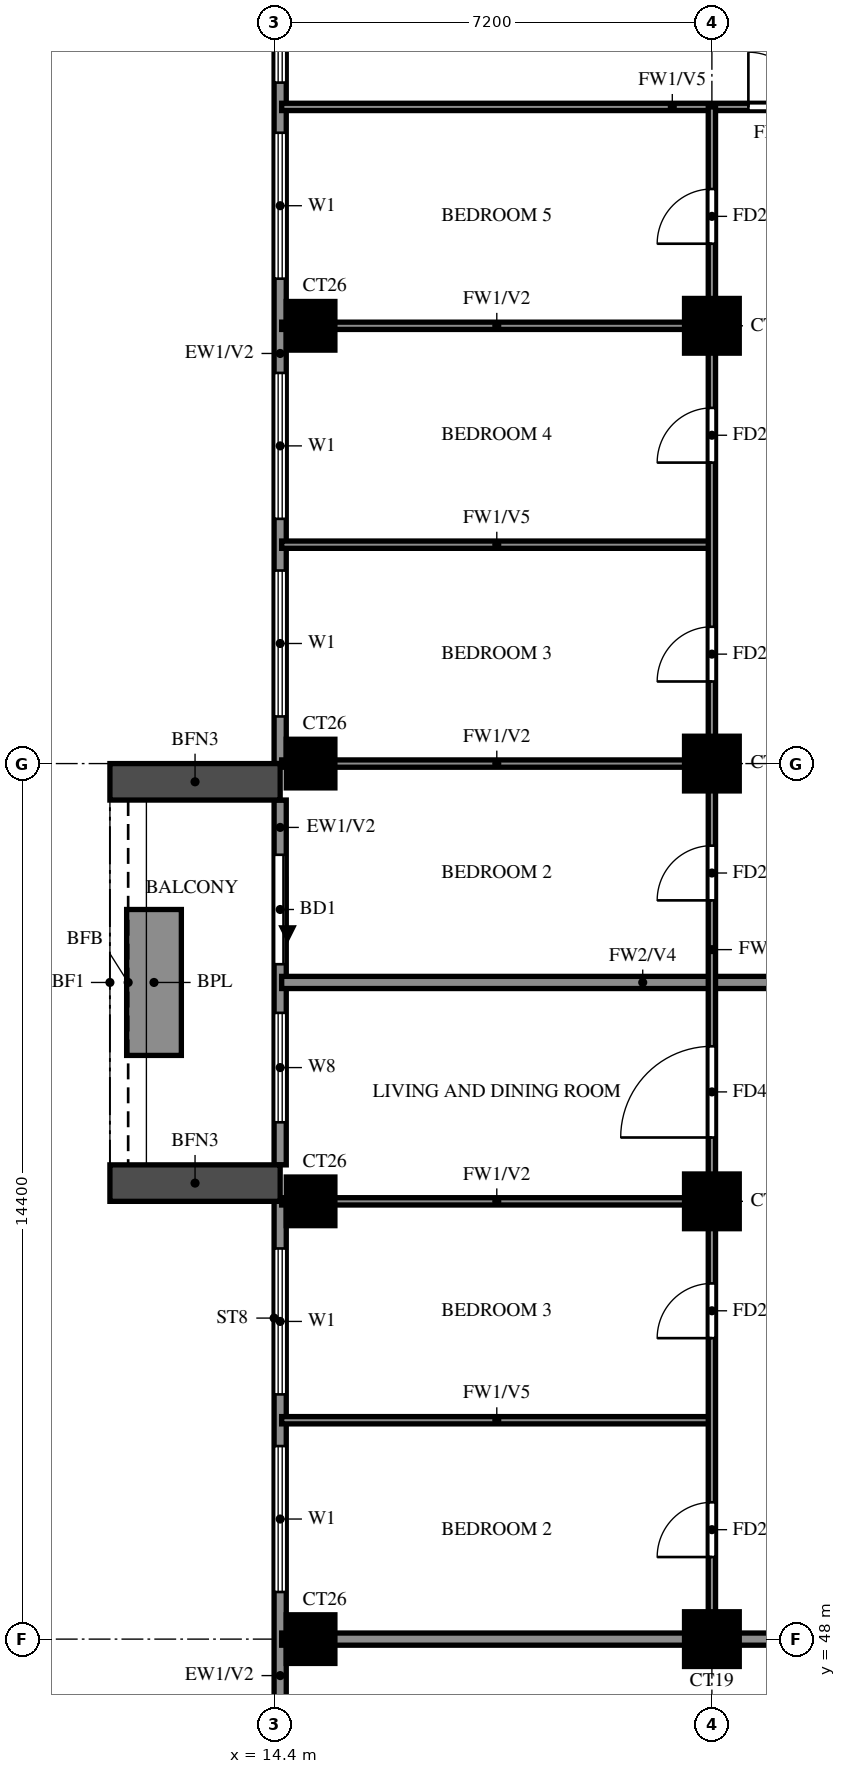
"""IFC4 building model, lengths in metres.
Left out: names, types, materials, properties, quantities, classifications, styles, units other than length and angle.
Written with IfcOpenShell. Run it as: python <this file> out.ifc"""

import sys

from ifc_helpers import new_model, si_unit, direction, frame, frame_2d, origin, origin_2d, place, context, subcontext, project, spatial, rectangle, extrude, source, transform, mapped, element, fill, save


model = new_model("IFC4")
c1 = context("Model", 3, precision=1e-05, world=origin(), true_north=direction((0.0, 1.0)))
c2 = subcontext(c1, "Body", "Model", "MODEL_VIEW")
j1 = project(units=[si_unit("LENGTHUNIT", "METRE"), si_unit("PLANEANGLEUNIT", "RADIAN")], contexts=[c1])
p1 = place(None, origin())
s1 = spatial("IfcSite", under=j1, at=p1, CompositionType="ELEMENT")
p2 = place(p1, origin())
s2 = spatial("IfcBuilding", under=s1, at=p2, CompositionType="ELEMENT")
p3 = place(p2, frame((0.0, 0.0, 185.0)))
s3 = spatial("IfcBuildingStorey", under=s2, at=p3, CompositionType="ELEMENT", Elevation=185.0)
m1 = source(origin(), c2, "Body", "SweptSolid", [
    extrude(rectangle(XDim=0.8, YDim=0.8, at=origin_2d()), origin(), (0.0, 0.0, 1.0), 3.2),
])
p4 = place(p3, frame((15.0, 48.0, 0.0), z_axis=(0.0, 0.0, 1.0), x_axis=(1.0, 0.0, 0.0)))
e1 = element("IfcColumn", 1, at=p4, inside=s3, PredefinedType="COLUMN", context=c2, shape_type="MappedRepresentation", body=[
    mapped(m1, transform((0.0, 0.0, 0.0))),
])
m2 = source(origin(), c2, "Body", "SweptSolid", [
    extrude(rectangle(XDim=0.9, YDim=0.9, at=origin_2d()), origin(), (0.0, 0.0, 1.0), 3.2),
])
p5 = place(p3, frame((21.6, 48.0, 0.0), z_axis=(0.0, 0.0, 1.0), x_axis=(1.0, 0.0, 0.0)))
e2 = element("IfcColumn", 2, at=p5, inside=s3, PredefinedType="COLUMN", context=c2, shape_type="MappedRepresentation", body=[
    mapped(m2, transform((0.0, 0.0, 0.0))),
])
p6 = place(p3, frame((15.0, 55.2, 0.0), z_axis=(0.0, 0.0, 1.0), x_axis=(1.0, 0.0, 0.0)))
e3 = element("IfcColumn", 3, at=p6, inside=s3, PredefinedType="COLUMN", context=c2, shape_type="MappedRepresentation", body=[
    mapped(m1, transform((0.0, 0.0, 0.0))),
])
p7 = place(p3, frame((21.6, 55.2, 0.0), z_axis=(0.0, 0.0, 1.0), x_axis=(1.0, 0.0, 0.0)))
e4 = element("IfcColumn", 4, at=p7, inside=s3, PredefinedType="COLUMN", context=c2, shape_type="MappedRepresentation", body=[
    mapped(m2, transform((0.0, 0.0, 0.0))),
])
p8 = place(p3, frame((15.0, 62.4, 0.0), z_axis=(0.0, 0.0, 1.0), x_axis=(1.0, 0.0, 0.0)))
e5 = element("IfcColumn", 5, at=p8, inside=s3, PredefinedType="COLUMN", context=c2, shape_type="MappedRepresentation", body=[
    mapped(m1, transform((0.0, 0.0, 0.0))),
])
p9 = place(p3, frame((21.6, 62.4, 0.0), z_axis=(0.0, 0.0, 1.0), x_axis=(1.0, 0.0, 0.0)))
e6 = element("IfcColumn", 6, at=p9, inside=s3, PredefinedType="COLUMN", context=c2, shape_type="MappedRepresentation", body=[
    mapped(m2, transform((0.0, 0.0, 0.0))),
])
p10 = place(p3, frame((15.0, 69.6, 0.0), z_axis=(0.0, 0.0, 1.0), x_axis=(1.0, 0.0, 0.0)))
e7 = element("IfcColumn", 7, at=p10, inside=s3, PredefinedType="COLUMN", context=c2, shape_type="MappedRepresentation", body=[
    mapped(m1, transform((0.0, 0.0, 0.0))),
])
p11 = place(p3, frame((21.6, 69.6, 0.0), z_axis=(0.0, 0.0, 1.0), x_axis=(1.0, 0.0, 0.0)))
e8 = element("IfcColumn", 8, at=p11, inside=s3, PredefinedType="COLUMN", context=c2, shape_type="MappedRepresentation", body=[
    mapped(m2, transform((0.0, 0.0, 0.0))),
])
p12 = place(p3, frame((14.5, 76.6, 0.0), z_axis=(0.0, 0.0, 1.0), x_axis=(0.0, -1.0, 0.0)))
e9 = element("IfcWall", 9, at=p12, inside=s3, PredefinedType="SOLIDWALL", context=c2, shape_type="SweptSolid", body=[
    extrude(rectangle(XDim=14.2, YDim=0.2, at=frame_2d((7.1, 0.0))), origin(), (0.0, 0.0, 1.0), 3.2),
])
p13 = place(p12, frame((11.025, 0.0, 0.6)))
e10 = element("IfcOpeningElement", 10, at=p13, cuts=e9, PredefinedType="OPENING", context=c2, shape_type="SweptSolid", body=[
    extrude(rectangle(XDim=2.4, YDim=2.4, at=frame_2d((1.2, 1.2))), frame((0.0, 0.11, 0.0), z_axis=(0.0, -1.0, 0.0), x_axis=(1.0, 0.0, 0.0)), (0.0, 0.0, 1.0), 0.22),
])
p14 = place(p12, frame((7.775, 0.0, 0.6)))
e11 = element("IfcOpeningElement", 11, at=p14, cuts=e9, PredefinedType="OPENING", context=c2, shape_type="SweptSolid", body=[
    extrude(rectangle(XDim=2.4, YDim=2.4, at=frame_2d((1.2, 1.2))), frame((0.0, 0.11, 0.0), z_axis=(0.0, -1.0, 0.0), x_axis=(1.0, 0.0, 0.0)), (0.0, 0.0, 1.0), 0.22),
])
p15 = place(p12, frame((3.825, 0.0, 0.6)))
e12 = element("IfcOpeningElement", 12, at=p15, cuts=e9, PredefinedType="OPENING", context=c2, shape_type="SweptSolid", body=[
    extrude(rectangle(XDim=2.4, YDim=2.4, at=frame_2d((1.2, 1.2))), frame((0.0, 0.11, 0.0), z_axis=(0.0, -1.0, 0.0), x_axis=(1.0, 0.0, 0.0)), (0.0, 0.0, 1.0), 0.22),
])
p16 = place(p12, frame((0.6, 0.0, 0.6)))
e13 = element("IfcOpeningElement", 13, at=p16, cuts=e9, PredefinedType="OPENING", context=c2, shape_type="SweptSolid", body=[
    extrude(rectangle(XDim=2.4, YDim=2.4, at=frame_2d((1.2, 1.2))), frame((0.0, 0.11, 0.0), z_axis=(0.0, -1.0, 0.0), x_axis=(1.0, 0.0, 0.0)), (0.0, 0.0, 1.0), 0.22),
])
p17 = place(p3, frame((14.5, 61.8, 0.0), z_axis=(0.0, 0.0, 1.0), x_axis=(0.0, -1.0, 0.0)))
e14 = element("IfcWall", 14, at=p17, inside=s3, PredefinedType="SOLIDWALL", context=c2, shape_type="SweptSolid", body=[
    extrude(rectangle(XDim=6.0, YDim=0.2, at=frame_2d((3.0, 0.0))), origin(), (0.0, 0.0, 1.0), 3.2),
])
p18 = place(p17, frame((0.9, 0.0, 0.0)))
e15 = element("IfcOpeningElement", 15, at=p18, cuts=e14, PredefinedType="OPENING", context=c2, shape_type="SweptSolid", body=[
    extrude(rectangle(XDim=1.8, YDim=2.4, at=frame_2d((0.9, 1.2))), frame((0.0, 0.11, 0.0), z_axis=(0.0, -1.0, 0.0), x_axis=(1.0, 0.0, 0.0)), (0.0, 0.0, 1.0), 0.22),
])
p19 = place(p17, frame((3.5, 0.0, 0.6)))
e16 = element("IfcOpeningElement", 16, at=p19, cuts=e14, PredefinedType="OPENING", context=c2, shape_type="SweptSolid", body=[
    extrude(rectangle(XDim=1.8, YDim=2.4, at=frame_2d((0.9, 1.2))), frame((0.0, 0.11, 0.0), z_axis=(0.0, -1.0, 0.0), x_axis=(1.0, 0.0, 0.0)), (0.0, 0.0, 1.0), 0.22),
])
p20 = place(p3, frame((14.5, 55.2, 0.0), z_axis=(0.0, 0.0, 1.0), x_axis=(0.0, -1.0, 0.0)))
e17 = element("IfcWall", 17, at=p20, inside=s3, PredefinedType="SOLIDWALL", context=c2, shape_type="SweptSolid", body=[
    extrude(rectangle(XDim=12.0, YDim=0.2, at=frame_2d((6.0, 0.0))), origin(), (0.0, 0.0, 1.0), 3.2),
])
p21 = place(p20, frame((8.475, 0.0, 0.6)))
e18 = element("IfcOpeningElement", 18, at=p21, cuts=e17, PredefinedType="OPENING", context=c2, shape_type="SweptSolid", body=[
    extrude(rectangle(XDim=2.4, YDim=2.4, at=frame_2d((1.2, 1.2))), frame((0.0, 0.11, 0.0), z_axis=(0.0, -1.0, 0.0), x_axis=(1.0, 0.0, 0.0)), (0.0, 0.0, 1.0), 0.22),
])
p22 = place(p20, frame((4.025, 0.0, 0.6)))
e19 = element("IfcOpeningElement", 19, at=p22, cuts=e17, PredefinedType="OPENING", context=c2, shape_type="SweptSolid", body=[
    extrude(rectangle(XDim=2.4, YDim=2.4, at=frame_2d((1.2, 1.2))), frame((0.0, 0.11, 0.0), z_axis=(0.0, -1.0, 0.0), x_axis=(1.0, 0.0, 0.0)), (0.0, 0.0, 1.0), 0.22),
])
p23 = place(p20, frame((0.775, 0.0, 0.6)))
e20 = element("IfcOpeningElement", 20, at=p23, cuts=e17, PredefinedType="OPENING", context=c2, shape_type="SweptSolid", body=[
    extrude(rectangle(XDim=2.4, YDim=2.4, at=frame_2d((1.2, 1.2))), frame((0.0, 0.11, 0.0), z_axis=(0.0, -1.0, 0.0), x_axis=(1.0, 0.0, 0.0)), (0.0, 0.0, 1.0), 0.22),
])
for number, where, z_axis, x_axis in (
    (21, (14.5, 62.1, 0.0), (0.0, 0.0, 1.0), (-1.0, 0.0, 0.0)),
    (22, (14.5, 55.5, 0.0), (0.0, 0.0, 1.0), (-1.0, 0.0, 0.0)),
):
    element("IfcWall", number, at=place(p3, frame(where, z_axis=z_axis, x_axis=x_axis)), inside=s3, PredefinedType="SOLIDWALL", context=c2, shape_type="SweptSolid", body=[
        extrude(rectangle(XDim=2.8, YDim=0.6, at=frame_2d((1.4, 0.0))), origin(), (0.0, 0.0, 1.0), 2.85),
    ])
p24 = place(p3, frame((12.425, 60.0, 0.0), z_axis=(0.0, 0.0, 1.0), x_axis=(0.0, -1.0, 0.0)))
e23 = element("IfcWall", 23, at=p24, inside=s3, PredefinedType="SOLIDWALL", context=c2, shape_type="SweptSolid", body=[
    extrude(rectangle(XDim=2.4, YDim=0.9, at=frame_2d((1.2, 0.0))), origin(), (0.0, 0.0, 1.0), 0.9),
])
p25 = place(p3, frame((14.525, 48.0, 0.0), z_axis=(0.0, 0.0, 1.0), x_axis=(1.0, 0.0, 0.0)))
e24 = element("IfcWall", 24, at=p25, inside=s3, PredefinedType="SOLIDWALL", context=c2, shape_type="SweptSolid", body=[
    extrude(rectangle(XDim=19.075, YDim=0.2, at=frame_2d((9.538, 0.0))), origin(), (0.0, 0.0, 1.0), 3.2),
])
p26 = place(p3, frame((14.525, 58.8, 0.0), z_axis=(0.0, 0.0, 1.0), x_axis=(1.0, 0.0, 0.0)))
e25 = element("IfcWall", 25, at=p26, inside=s3, PredefinedType="SOLIDWALL", context=c2, shape_type="SweptSolid", body=[
    extrude(rectangle(XDim=11.875, YDim=0.2, at=frame_2d((5.938, 0.0))), origin(), (0.0, 0.0, 1.0), 2.3),
])
p27 = place(p3, frame((14.525, 51.6, 0.0), z_axis=(0.0, 0.0, 1.0), x_axis=(1.0, 0.0, 0.0)))
e26 = element("IfcWall", 26, at=p27, inside=s3, PredefinedType="PARTITIONING", context=c2, shape_type="SweptSolid", body=[
    extrude(rectangle(XDim=7.075, YDim=0.12, at=frame_2d((3.538, 0.0))), origin(), (0.0, 0.0, 1.0), 2.3),
])
for number, where, z_axis, x_axis in (
    (27, (14.525, 55.2, 0.0), (0.0, 0.0, 1.0), (1.0, 0.0, 0.0)),
    (28, (14.525, 62.4, 0.0), (0.0, 0.0, 1.0), (1.0, 0.0, 0.0)),
):
    element("IfcWall", number, at=place(p3, frame(where, z_axis=z_axis, x_axis=x_axis)), inside=s3, PredefinedType="PARTITIONING", context=c2, shape_type="SweptSolid", body=[
        extrude(rectangle(XDim=7.075, YDim=0.12, at=frame_2d((3.538, 0.0))), origin(), (0.0, 0.0, 1.0), 3.2),
    ])
p28 = place(p3, frame((14.525, 66.0, 0.0), z_axis=(0.0, 0.0, 1.0), x_axis=(1.0, 0.0, 0.0)))
e29 = element("IfcWall", 29, at=p28, inside=s3, PredefinedType="PARTITIONING", context=c2, shape_type="SweptSolid", body=[
    extrude(rectangle(XDim=7.075, YDim=0.12, at=frame_2d((3.538, 0.0))), origin(), (0.0, 0.0, 1.0), 2.3),
])
p29 = place(p3, frame((14.525, 69.6, 0.0), z_axis=(0.0, 0.0, 1.0), x_axis=(1.0, 0.0, 0.0)))
e30 = element("IfcWall", 30, at=p29, inside=s3, PredefinedType="PARTITIONING", context=c2, shape_type="SweptSolid", body=[
    extrude(rectangle(XDim=7.075, YDim=0.12, at=frame_2d((3.538, 0.0))), origin(), (0.0, 0.0, 1.0), 3.2),
])
p30 = place(p3, frame((14.525, 73.2, 0.0), z_axis=(0.0, 0.0, 1.0), x_axis=(1.0, 0.0, 0.0)))
e31 = element("IfcWall", 31, at=p30, inside=s3, PredefinedType="PARTITIONING", context=c2, shape_type="SweptSolid", body=[
    extrude(rectangle(XDim=14.275, YDim=0.12, at=frame_2d((7.138, 0.0))), origin(), (0.0, 0.0, 1.0), 2.3),
])
p31 = place(p30, frame((7.675, 0.0, 0.0)))
e32 = element("IfcOpeningElement", 32, at=p31, cuts=e31, PredefinedType="OPENING", context=c2, shape_type="SweptSolid", body=[
    extrude(rectangle(XDim=0.9, YDim=2.1, at=frame_2d((0.45, 1.05))), frame((0.0, 0.07, 0.0), z_axis=(0.0, -1.0, 0.0), x_axis=(1.0, 0.0, 0.0)), (0.0, 0.0, 1.0), 0.14),
])
p32 = place(p3, frame((21.6, 48.0, 0.0), z_axis=(0.0, 0.0, 1.0), x_axis=(0.0, 1.0, 0.0)))
e33 = element("IfcWall", 33, at=p32, inside=s3, PredefinedType="PARTITIONING", context=c2, shape_type="SweptSolid", body=[
    extrude(rectangle(XDim=25.2, YDim=0.12, at=frame_2d((12.6, 0.0))), origin(), (0.0, 0.0, 1.0), 3.2),
])
p33 = place(p32, frame((1.35, 0.0, 0.0)))
e34 = element("IfcOpeningElement", 34, at=p33, cuts=e33, PredefinedType="OPENING", context=c2, shape_type="SweptSolid", body=[
    extrude(rectangle(XDim=0.9, YDim=2.1, at=frame_2d((0.45, 1.05))), frame((0.0, 0.07, 0.0), z_axis=(0.0, -1.0, 0.0), x_axis=(1.0, 0.0, 0.0)), (0.0, 0.0, 1.0), 0.14),
])
p34 = place(p32, frame((4.95, 0.0, 0.0)))
e35 = element("IfcOpeningElement", 35, at=p34, cuts=e33, PredefinedType="OPENING", context=c2, shape_type="SweptSolid", body=[
    extrude(rectangle(XDim=0.9, YDim=2.1, at=frame_2d((0.45, 1.05))), frame((0.0, 0.07, 0.0), z_axis=(0.0, -1.0, 0.0), x_axis=(1.0, 0.0, 0.0)), (0.0, 0.0, 1.0), 0.14),
])
p35 = place(p32, frame((8.25, 0.0, 0.0)))
e36 = element("IfcOpeningElement", 36, at=p35, cuts=e33, PredefinedType="OPENING", context=c2, shape_type="SweptSolid", body=[
    extrude(rectangle(XDim=1.5, YDim=2.1, at=frame_2d((0.75, 1.05))), frame((0.0, 0.07, 0.0), z_axis=(0.0, -1.0, 0.0), x_axis=(1.0, 0.0, 0.0)), (0.0, 0.0, 1.0), 0.14),
])
p36 = place(p32, frame((12.15, 0.0, 0.0)))
e37 = element("IfcOpeningElement", 37, at=p36, cuts=e33, PredefinedType="OPENING", context=c2, shape_type="SweptSolid", body=[
    extrude(rectangle(XDim=0.9, YDim=2.1, at=frame_2d((0.45, 1.05))), frame((0.0, 0.07, 0.0), z_axis=(0.0, -1.0, 0.0), x_axis=(1.0, 0.0, 0.0)), (0.0, 0.0, 1.0), 0.14),
])
p37 = place(p32, frame((15.75, 0.0, 0.0)))
e38 = element("IfcOpeningElement", 38, at=p37, cuts=e33, PredefinedType="OPENING", context=c2, shape_type="SweptSolid", body=[
    extrude(rectangle(XDim=0.9, YDim=2.1, at=frame_2d((0.45, 1.05))), frame((0.0, 0.07, 0.0), z_axis=(0.0, -1.0, 0.0), x_axis=(1.0, 0.0, 0.0)), (0.0, 0.0, 1.0), 0.14),
])
p38 = place(p32, frame((19.35, 0.0, 0.0)))
e39 = element("IfcOpeningElement", 39, at=p38, cuts=e33, PredefinedType="OPENING", context=c2, shape_type="SweptSolid", body=[
    extrude(rectangle(XDim=0.9, YDim=2.1, at=frame_2d((0.45, 1.05))), frame((0.0, 0.07, 0.0), z_axis=(0.0, -1.0, 0.0), x_axis=(1.0, 0.0, 0.0)), (0.0, 0.0, 1.0), 0.14),
])
p39 = place(p32, frame((22.95, 0.0, 0.0)))
e40 = element("IfcOpeningElement", 40, at=p39, cuts=e33, PredefinedType="OPENING", context=c2, shape_type="SweptSolid", body=[
    extrude(rectangle(XDim=0.9, YDim=2.1, at=frame_2d((0.45, 1.05))), frame((0.0, 0.07, 0.0), z_axis=(0.0, -1.0, 0.0), x_axis=(1.0, 0.0, 0.0)), (0.0, 0.0, 1.0), 0.14),
])
p40 = place(p13, origin())
e41 = element("IfcWindow", 41, at=p40, inside=s3, PartitioningType="DOUBLE_PANEL_VERTICAL", PredefinedType="WINDOW", context=c2, shape_type="SweptSolid", body=[
    extrude(rectangle(XDim=2.4, YDim=2.4, at=frame_2d((1.2, 1.2))), frame((0.0, 0.03, 0.0), z_axis=(0.0, -1.0, 0.0), x_axis=(1.0, 0.0, 0.0)), (0.0, 0.0, 1.0), 0.06),
])
fill(e10, e41)
p41 = place(p14, origin())
e42 = element("IfcWindow", 42, at=p41, inside=s3, PartitioningType="DOUBLE_PANEL_VERTICAL", PredefinedType="WINDOW", context=c2, shape_type="SweptSolid", body=[
    extrude(rectangle(XDim=2.4, YDim=2.4, at=frame_2d((1.2, 1.2))), frame((0.0, 0.03, 0.0), z_axis=(0.0, -1.0, 0.0), x_axis=(1.0, 0.0, 0.0)), (0.0, 0.0, 1.0), 0.06),
])
fill(e11, e42)
p42 = place(p15, origin())
e43 = element("IfcWindow", 43, at=p42, inside=s3, PartitioningType="DOUBLE_PANEL_VERTICAL", PredefinedType="WINDOW", context=c2, shape_type="SweptSolid", body=[
    extrude(rectangle(XDim=2.4, YDim=2.4, at=frame_2d((1.2, 1.2))), frame((0.0, 0.03, 0.0), z_axis=(0.0, -1.0, 0.0), x_axis=(1.0, 0.0, 0.0)), (0.0, 0.0, 1.0), 0.06),
])
fill(e12, e43)
p43 = place(p16, origin())
e44 = element("IfcWindow", 44, at=p43, inside=s3, PartitioningType="DOUBLE_PANEL_VERTICAL", PredefinedType="WINDOW", context=c2, shape_type="SweptSolid", body=[
    extrude(rectangle(XDim=2.4, YDim=2.4, at=frame_2d((1.2, 1.2))), frame((0.0, 0.03, 0.0), z_axis=(0.0, -1.0, 0.0), x_axis=(1.0, 0.0, 0.0)), (0.0, 0.0, 1.0), 0.06),
])
fill(e13, e44)
p44 = place(p18, origin())
e45 = element("IfcDoor", 45, at=p44, inside=s3, OperationType="DOUBLE_DOOR_SLIDING", PredefinedType="DOOR", context=c2, shape_type="SweptSolid", body=[
    extrude(rectangle(XDim=1.8, YDim=2.4, at=frame_2d((0.9, 1.2))), frame((0.0, 0.025, 0.0), z_axis=(0.0, -1.0, 0.0), x_axis=(1.0, 0.0, 0.0)), (0.0, 0.0, 1.0), 0.05),
])
fill(e15, e45)
p45 = place(p19, origin())
e46 = element("IfcWindow", 46, at=p45, inside=s3, PartitioningType="DOUBLE_PANEL_VERTICAL", PredefinedType="WINDOW", context=c2, shape_type="SweptSolid", body=[
    extrude(rectangle(XDim=1.8, YDim=2.4, at=frame_2d((0.9, 1.2))), frame((0.0, 0.03, 0.0), z_axis=(0.0, -1.0, 0.0), x_axis=(1.0, 0.0, 0.0)), (0.0, 0.0, 1.0), 0.06),
])
fill(e16, e46)
p46 = place(p22, origin())
e47 = element("IfcWindow", 47, at=p46, inside=s3, PartitioningType="DOUBLE_PANEL_VERTICAL", PredefinedType="WINDOW", context=c2, shape_type="SweptSolid", body=[
    extrude(rectangle(XDim=2.4, YDim=2.4, at=frame_2d((1.2, 1.2))), frame((0.0, 0.03, 0.0), z_axis=(0.0, -1.0, 0.0), x_axis=(1.0, 0.0, 0.0)), (0.0, 0.0, 1.0), 0.06),
])
fill(e19, e47)
p47 = place(p23, origin())
e48 = element("IfcWindow", 48, at=p47, inside=s3, PartitioningType="DOUBLE_PANEL_VERTICAL", PredefinedType="WINDOW", context=c2, shape_type="SweptSolid", body=[
    extrude(rectangle(XDim=2.4, YDim=2.4, at=frame_2d((1.2, 1.2))), frame((0.0, 0.03, 0.0), z_axis=(0.0, -1.0, 0.0), x_axis=(1.0, 0.0, 0.0)), (0.0, 0.0, 1.0), 0.06),
])
fill(e20, e48)
p48 = place(p33, origin())
e49 = element("IfcDoor", 49, at=p48, inside=s3, OperationType="SINGLE_SWING_RIGHT", PredefinedType="DOOR", context=c2, shape_type="SweptSolid", body=[
    extrude(rectangle(XDim=0.9, YDim=2.1, at=frame_2d((0.45, 1.05))), frame((0.0, 0.025, 0.0), z_axis=(0.0, -1.0, 0.0), x_axis=(1.0, 0.0, 0.0)), (0.0, 0.0, 1.0), 0.05),
])
fill(e34, e49)
p49 = place(p34, origin())
e50 = element("IfcDoor", 50, at=p49, inside=s3, OperationType="SINGLE_SWING_LEFT", PredefinedType="DOOR", context=c2, shape_type="SweptSolid", body=[
    extrude(rectangle(XDim=0.9, YDim=2.1, at=frame_2d((0.45, 1.05))), frame((0.0, 0.025, 0.0), z_axis=(0.0, -1.0, 0.0), x_axis=(1.0, 0.0, 0.0)), (0.0, 0.0, 1.0), 0.05),
])
fill(e35, e50)
p50 = place(p35, origin())
e51 = element("IfcDoor", 51, at=p50, inside=s3, OperationType="SINGLE_SWING_LEFT", PredefinedType="DOOR", context=c2, shape_type="SweptSolid", body=[
    extrude(rectangle(XDim=1.5, YDim=2.1, at=frame_2d((0.75, 1.05))), frame((0.0, 0.025, 0.0), z_axis=(0.0, -1.0, 0.0), x_axis=(1.0, 0.0, 0.0)), (0.0, 0.0, 1.0), 0.05),
])
fill(e36, e51)
p51 = place(p36, origin())
e52 = element("IfcDoor", 52, at=p51, inside=s3, OperationType="SINGLE_SWING_LEFT", PredefinedType="DOOR", context=c2, shape_type="SweptSolid", body=[
    extrude(rectangle(XDim=0.9, YDim=2.1, at=frame_2d((0.45, 1.05))), frame((0.0, 0.025, 0.0), z_axis=(0.0, -1.0, 0.0), x_axis=(1.0, 0.0, 0.0)), (0.0, 0.0, 1.0), 0.05),
])
fill(e37, e52)
p52 = place(p37, origin())
e53 = element("IfcDoor", 53, at=p52, inside=s3, OperationType="SINGLE_SWING_RIGHT", PredefinedType="DOOR", context=c2, shape_type="SweptSolid", body=[
    extrude(rectangle(XDim=0.9, YDim=2.1, at=frame_2d((0.45, 1.05))), frame((0.0, 0.025, 0.0), z_axis=(0.0, -1.0, 0.0), x_axis=(1.0, 0.0, 0.0)), (0.0, 0.0, 1.0), 0.05),
])
fill(e38, e53)
p53 = place(p38, origin())
e54 = element("IfcDoor", 54, at=p53, inside=s3, OperationType="SINGLE_SWING_LEFT", PredefinedType="DOOR", context=c2, shape_type="SweptSolid", body=[
    extrude(rectangle(XDim=0.9, YDim=2.1, at=frame_2d((0.45, 1.05))), frame((0.0, 0.025, 0.0), z_axis=(0.0, -1.0, 0.0), x_axis=(1.0, 0.0, 0.0)), (0.0, 0.0, 1.0), 0.05),
])
fill(e39, e54)
p54 = place(p39, origin())
e55 = element("IfcDoor", 55, at=p54, inside=s3, OperationType="SINGLE_SWING_LEFT", PredefinedType="DOOR", context=c2, shape_type="SweptSolid", body=[
    extrude(rectangle(XDim=0.9, YDim=2.1, at=frame_2d((0.45, 1.05))), frame((0.0, 0.025, 0.0), z_axis=(0.0, -1.0, 0.0), x_axis=(1.0, 0.0, 0.0)), (0.0, 0.0, 1.0), 0.05),
])
fill(e40, e55)
p55 = place(p31, origin())
e56 = element("IfcDoor", 56, at=p55, inside=s3, OperationType="SINGLE_SWING_RIGHT", PredefinedType="DOOR", context=c2, shape_type="SweptSolid", body=[
    extrude(rectangle(XDim=0.9, YDim=2.1, at=frame_2d((0.45, 1.05))), frame((0.0, 0.025, 0.0), z_axis=(0.0, -1.0, 0.0), x_axis=(1.0, 0.0, 0.0)), (0.0, 0.0, 1.0), 0.05),
])
fill(e32, e56)
save(model, sys.argv[1])
